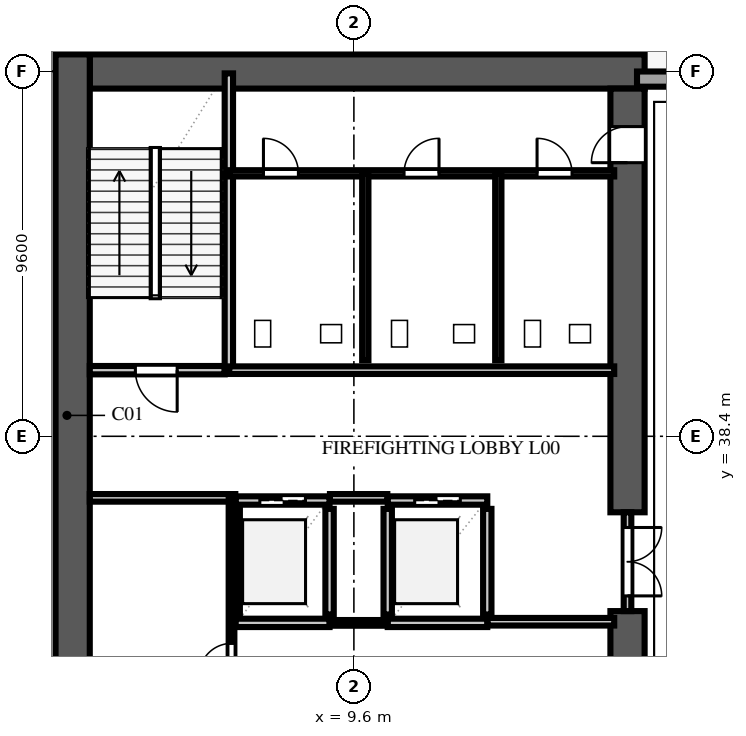
"""IFC4 building model, lengths in metres.
Left out: names, types, materials, properties, quantities, classifications, styles, units other than length and angle.
Written with IfcOpenShell. Run it as: python <this file> out.ifc"""

import sys

from ifc_helpers import new_model, si_unit, direction, frame, frame_2d, origin, place, context, subcontext, project, spatial, rectangle, extrude, element, fill, save


model = new_model("IFC4")
c1 = context("Model", 3, precision=1e-05, world=origin(), true_north=direction((0.0, 1.0)))
c2 = subcontext(c1, "Body", "Model", "MODEL_VIEW")
j1 = project(units=[si_unit("LENGTHUNIT", "METRE"), si_unit("PLANEANGLEUNIT", "RADIAN")], contexts=[c1])
p1 = place(None, origin())
s1 = spatial("IfcSite", under=j1, at=p1, CompositionType="ELEMENT")
p2 = place(p1, origin())
s2 = spatial("IfcBuilding", under=s1, at=p2, CompositionType="ELEMENT")
p3 = place(p2, origin())
s3 = spatial("IfcBuildingStorey", under=s2, at=p3, CompositionType="ELEMENT", Elevation=0.0)
p4 = place(p3, frame((2.65, 48.0, 0.0), z_axis=(0.0, 0.0, 1.0), x_axis=(1.0, 0.0, 0.0)))
e1 = element("IfcWall", 1, at=p4, inside=s3, PredefinedType="SHEAR", context=c2, shape_type="SweptSolid", body=[
    extrude(rectangle(XDim=14.6, YDim=0.9, at=frame_2d((7.3, 0.0))), origin(), (0.0, 0.0, 1.0), 4.86),
])
p5 = place(p3, frame((2.2, 9.15, 0.0), z_axis=(0.0, 0.0, 1.0), x_axis=(0.0, 1.0, 0.0)))
e2 = element("IfcWall", 2, at=p5, inside=s3, PredefinedType="SHEAR", context=c2, shape_type="SweptSolid", body=[
    extrude(rectangle(XDim=39.3, YDim=0.9, at=frame_2d((19.65, 0.0))), origin(), (0.0, 0.0, 1.0), 4.86),
])
p6 = place(p3, frame((16.8, 26.0, 0.0), z_axis=(0.0, 0.0, 1.0), x_axis=(0.0, 1.0, 0.0)))
e3 = element("IfcWall", 3, at=p6, inside=s3, PredefinedType="SHEAR", context=c2, shape_type="SweptSolid", body=[
    extrude(rectangle(XDim=7.8, YDim=0.9, at=frame_2d((3.9, 0.0))), origin(), (0.0, 0.0, 1.0), 4.86),
])
p7 = place(p3, frame((16.8, 36.4, 0.0), z_axis=(0.0, 0.0, 1.0), x_axis=(0.0, 1.0, 0.0)))
e4 = element("IfcWall", 4, at=p7, inside=s3, PredefinedType="SHEAR", context=c2, shape_type="SweptSolid", body=[
    extrude(rectangle(XDim=11.15, YDim=0.9, at=frame_2d((5.575, 0.0))), origin(), (0.0, 0.0, 1.0), 4.86),
])
p8 = place(p7, frame((9.2, 0.0, 0.0)))
e5 = element("IfcOpeningElement", 5, at=p8, cuts=e4, PredefinedType="OPENING", context=c2, shape_type="SweptSolid", body=[
    extrude(rectangle(XDim=0.95, YDim=2.15, at=frame_2d((0.475, 1.075))), frame((0.0, 0.462, 0.0), z_axis=(0.0, -1.0, 0.0), x_axis=(1.0, 0.0, 0.0)), (0.0, 0.0, 1.0), 0.924),
])
p9 = place(p3, frame((17.05, 47.8, 0.0), z_axis=(0.0, 0.0, 1.0), x_axis=(1.0, 0.0, 0.0)))
e6 = element("IfcWall", 6, at=p9, inside=s3, PredefinedType="SOLIDWALL", context=c2, shape_type="SweptSolid", body=[
    extrude(rectangle(XDim=1.35, YDim=0.4, at=frame_2d((0.675, 0.0))), origin(), (0.0, 0.0, 1.0), 4.86),
])
p10 = place(p3, frame((2.65, 40.14, 0.0), z_axis=(0.0, 0.0, 1.0), x_axis=(1.0, 0.0, 0.0)))
e7 = element("IfcWall", 7, at=p10, inside=s3, PredefinedType="SOLIDWALL", context=c2, shape_type="SweptSolid", body=[
    extrude(rectangle(XDim=3.55, YDim=0.22, at=frame_2d((1.775, 0.0))), origin(), (0.0, 0.0, 1.0), 4.86),
])
p11 = place(p10, frame((1.2, 0.0, 0.0)))
e8 = element("IfcOpeningElement", 8, at=p11, cuts=e7, PredefinedType="OPENING", context=c2, shape_type="SweptSolid", body=[
    extrude(rectangle(XDim=1.1, YDim=2.2, at=frame_2d((0.55, 1.1))), frame((0.0, 0.122, 0.0), z_axis=(0.0, -1.0, 0.0), x_axis=(1.0, 0.0, 0.0)), (0.0, 0.0, 1.0), 0.244),
])
p12 = place(p3, frame((6.31, 40.14, 0.0), z_axis=(0.0, 0.0, 1.0), x_axis=(0.0, 1.0, 0.0)))
e9 = element("IfcWall", 9, at=p12, inside=s3, PredefinedType="SOLIDWALL", context=c2, shape_type="SweptSolid", body=[
    extrude(rectangle(XDim=7.81, YDim=0.22, at=frame_2d((3.905, 0.0))), origin(), (0.0, 0.0, 1.0), 4.86),
])
for number, where, z_axis, x_axis in (
    (10, (6.49, 33.71, 0.0), (0.0, 0.0, 1.0), (0.0, 1.0, 0.0)),
    (11, (8.96, 33.71, 0.0), (0.0, 0.0, 1.0), (0.0, 1.0, 0.0)),
):
    element("IfcWall", number, at=place(p3, frame(where, z_axis=z_axis, x_axis=x_axis)), inside=s3, PredefinedType="SOLIDWALL", context=c2, shape_type="SweptSolid", body=[
        extrude(rectangle(XDim=2.78, YDim=0.22, at=frame_2d((1.39, 0.0))), origin(), (0.0, 0.0, 1.0), 4.86),
    ])
p13 = place(p3, frame((6.49, 33.49, 0.0), z_axis=(0.0, 0.0, 1.0), x_axis=(1.0, 0.0, 0.0)))
e12 = element("IfcWall", 12, at=p13, inside=s3, PredefinedType="SOLIDWALL", context=c2, shape_type="SweptSolid", body=[
    extrude(rectangle(XDim=2.47, YDim=0.22, at=frame_2d((1.235, 0.0))), origin(), (0.0, 0.0, 1.0), 4.86),
])
p14 = place(p3, frame((6.49, 36.71, 0.0), z_axis=(0.0, 0.0, 1.0), x_axis=(1.0, 0.0, 0.0)))
e13 = element("IfcWall", 13, at=p14, inside=s3, PredefinedType="SOLIDWALL", context=c2, shape_type="SweptSolid", body=[
    extrude(rectangle(XDim=2.47, YDim=0.22, at=frame_2d((1.235, 0.0))), origin(), (0.0, 0.0, 1.0), 4.86),
])
p15 = place(p14, frame((0.635, 0.0, 0.0)))
e14 = element("IfcOpeningElement", 14, at=p15, cuts=e13, PredefinedType="OPENING", context=c2, shape_type="SweptSolid", body=[
    extrude(rectangle(XDim=1.2, YDim=2.2, at=frame_2d((0.6, 1.1))), frame((0.0, 0.122, 0.0), z_axis=(0.0, -1.0, 0.0), x_axis=(1.0, 0.0, 0.0)), (0.0, 0.0, 1.0), 0.244),
])
for number, where, z_axis, x_axis in (
    (15, (10.49, 33.71, 0.0), (0.0, 0.0, 1.0), (0.0, 1.0, 0.0)),
    (16, (13.11, 33.71, 0.0), (0.0, 0.0, 1.0), (0.0, 1.0, 0.0)),
):
    element("IfcWall", number, at=place(p3, frame(where, z_axis=z_axis, x_axis=x_axis)), inside=s3, PredefinedType="SOLIDWALL", context=c2, shape_type="SweptSolid", body=[
        extrude(rectangle(XDim=2.78, YDim=0.22, at=frame_2d((1.39, 0.0))), origin(), (0.0, 0.0, 1.0), 4.86),
    ])
p16 = place(p3, frame((10.49, 33.49, 0.0), z_axis=(0.0, 0.0, 1.0), x_axis=(1.0, 0.0, 0.0)))
e17 = element("IfcWall", 17, at=p16, inside=s3, PredefinedType="SOLIDWALL", context=c2, shape_type="SweptSolid", body=[
    extrude(rectangle(XDim=2.62, YDim=0.22, at=frame_2d((1.31, 0.0))), origin(), (0.0, 0.0, 1.0), 4.86),
])
p17 = place(p3, frame((10.49, 36.71, 0.0), z_axis=(0.0, 0.0, 1.0), x_axis=(1.0, 0.0, 0.0)))
e18 = element("IfcWall", 18, at=p17, inside=s3, PredefinedType="SOLIDWALL", context=c2, shape_type="SweptSolid", body=[
    extrude(rectangle(XDim=2.62, YDim=0.22, at=frame_2d((1.31, 0.0))), origin(), (0.0, 0.0, 1.0), 4.86),
])
p18 = place(p17, frame((0.71, 0.0, 0.0)))
e19 = element("IfcOpeningElement", 19, at=p18, cuts=e18, PredefinedType="OPENING", context=c2, shape_type="SweptSolid", body=[
    extrude(rectangle(XDim=1.2, YDim=2.2, at=frame_2d((0.6, 1.1))), frame((0.0, 0.122, 0.0), z_axis=(0.0, -1.0, 0.0), x_axis=(1.0, 0.0, 0.0)), (0.0, 0.0, 1.0), 0.244),
])
p19 = place(p3, frame((2.65, 36.78, 0.0), z_axis=(0.0, 0.0, 1.0), x_axis=(1.0, 0.0, 0.0)))
e20 = element("IfcWall", 20, at=p19, inside=s3, PredefinedType="SOLIDWALL", context=c2, shape_type="SweptSolid", body=[
    extrude(rectangle(XDim=3.83, YDim=0.2, at=frame_2d((1.915, 0.0))), origin(), (0.0, 0.0, 1.0), 4.86),
])
p20 = place(p3, frame((8.97, 36.78, 0.0), z_axis=(0.0, 0.0, 1.0), x_axis=(1.0, 0.0, 0.0)))
e21 = element("IfcWall", 21, at=p20, inside=s3, PredefinedType="SOLIDWALL", context=c2, shape_type="SweptSolid", body=[
    extrude(rectangle(XDim=1.51, YDim=0.2, at=frame_2d((0.755, 0.0))), origin(), (0.0, 0.0, 1.0), 4.86),
])
p21 = place(p3, frame((13.12, 33.52, 0.0), z_axis=(0.0, 0.0, 1.0), x_axis=(1.0, 0.0, 0.0)))
e22 = element("IfcWall", 22, at=p21, inside=s3, PredefinedType="SOLIDWALL", context=c2, shape_type="SweptSolid", body=[
    extrude(rectangle(XDim=3.33, YDim=0.2, at=frame_2d((1.665, 0.0))), origin(), (0.0, 0.0, 1.0), 4.86),
])
p22 = place(p3, frame((6.32, 40.14, 0.0), z_axis=(0.0, 0.0, 1.0), x_axis=(1.0, 0.0, 0.0)))
e23 = element("IfcWall", 23, at=p22, inside=s3, PredefinedType="SOLIDWALL", context=c2, shape_type="SweptSolid", body=[
    extrude(rectangle(XDim=10.13, YDim=0.2, at=frame_2d((5.065, 0.0))), origin(), (0.0, 0.0, 1.0), 4.86),
])
p23 = place(p3, frame((16.8, 33.8, 0.0), z_axis=(0.0, 0.0, 1.0), x_axis=(0.0, 1.0, 0.0)))
e24 = element("IfcWall", 24, at=p23, inside=s3, PredefinedType="SOLIDWALL", context=c2, shape_type="SweptSolid", body=[
    extrude(rectangle(XDim=2.6, YDim=0.2, at=frame_2d((1.3, 0.0))), origin(), (0.0, 0.0, 1.0), 4.86),
])
p24 = place(p23, frame((0.4, 0.0, 0.0)))
e25 = element("IfcOpeningElement", 25, at=p24, cuts=e24, PredefinedType="OPENING", context=c2, shape_type="SweptSolid", body=[
    extrude(rectangle(XDim=1.8, YDim=2.2, at=frame_2d((0.9, 1.1))), frame((0.0, 0.112, 0.0), z_axis=(0.0, -1.0, 0.0), x_axis=(1.0, 0.0, 0.0)), (0.0, 0.0, 1.0), 0.224),
])
p25 = place(p3, frame((8.965, 33.49, 0.0), z_axis=(0.0, 0.0, 1.0), x_axis=(1.0, 0.0, 0.0)))
e26 = element("IfcWall", 26, at=p25, inside=s3, PredefinedType="PARTITIONING", context=c2, shape_type="SweptSolid", body=[
    extrude(rectangle(XDim=1.52, YDim=0.15, at=frame_2d((0.76, 0.0))), origin(), (0.0, 0.0, 1.0), 4.86),
])
p26 = place(p3, frame((6.38, 17.8, 0.0), z_axis=(0.0, 0.0, 1.0), x_axis=(0.0, 1.0, 0.0)))
e27 = element("IfcWall", 27, at=p26, inside=s3, PredefinedType="PARTITIONING", context=c2, shape_type="SweptSolid", body=[
    extrude(rectangle(XDim=18.98, YDim=0.15, at=frame_2d((9.49, 0.0))), origin(), (0.0, 0.0, 1.0), 4.86),
])
p27 = place(p26, frame((14.3, 0.0, 0.0)))
e28 = element("IfcOpeningElement", 28, at=p27, cuts=e27, PredefinedType="OPENING", context=c2, shape_type="SweptSolid", body=[
    extrude(rectangle(XDim=0.85, YDim=2.1, at=frame_2d((0.425, 1.05))), frame((0.0, 0.087, 0.0), z_axis=(0.0, -1.0, 0.0), x_axis=(1.0, 0.0, 0.0)), (0.0, 0.0, 1.0), 0.174),
])
p28 = place(p3, frame((6.32, 45.32, 0.0), z_axis=(0.0, 0.0, 1.0), x_axis=(1.0, 0.0, 0.0)))
e29 = element("IfcWall", 29, at=p28, inside=s3, PredefinedType="PLUMBINGWALL", context=c2, shape_type="SweptSolid", body=[
    extrude(rectangle(XDim=10.13, YDim=0.165, at=frame_2d((5.065, 0.0))), origin(), (0.0, 0.0, 1.0), 4.86),
])
p29 = place(p28, frame((0.9, 0.0, 0.0)))
e30 = element("IfcOpeningElement", 30, at=p29, cuts=e29, PredefinedType="OPENING", context=c2, shape_type="SweptSolid", body=[
    extrude(rectangle(XDim=0.92, YDim=2.15, at=frame_2d((0.46, 1.075))), frame((0.0, 0.094, 0.0), z_axis=(0.0, -1.0, 0.0), x_axis=(1.0, 0.0, 0.0)), (0.0, 0.0, 1.0), 0.189),
])
p30 = place(p28, frame((4.6, 0.0, 0.0)))
e31 = element("IfcOpeningElement", 31, at=p30, cuts=e29, PredefinedType="OPENING", context=c2, shape_type="SweptSolid", body=[
    extrude(rectangle(XDim=0.92, YDim=2.15, at=frame_2d((0.46, 1.075))), frame((0.0, 0.094, 0.0), z_axis=(0.0, -1.0, 0.0), x_axis=(1.0, 0.0, 0.0)), (0.0, 0.0, 1.0), 0.189),
])
p31 = place(p28, frame((8.1, 0.0, 0.0)))
e32 = element("IfcOpeningElement", 32, at=p31, cuts=e29, PredefinedType="OPENING", context=c2, shape_type="SweptSolid", body=[
    extrude(rectangle(XDim=0.92, YDim=2.15, at=frame_2d((0.46, 1.075))), frame((0.0, 0.094, 0.0), z_axis=(0.0, -1.0, 0.0), x_axis=(1.0, 0.0, 0.0)), (0.0, 0.0, 1.0), 0.189),
])
for number, where, z_axis, x_axis in (
    (33, (9.9, 40.4, 0.0), (0.0, 0.0, 1.0), (0.0, 1.0, 0.0)),
    (34, (13.4, 40.4, 0.0), (0.0, 0.0, 1.0), (0.0, 1.0, 0.0)),
):
    element("IfcWall", number, at=place(p3, frame(where, z_axis=z_axis, x_axis=x_axis)), inside=s3, PredefinedType="PLUMBINGWALL", context=c2, shape_type="SweptSolid", body=[
        extrude(rectangle(XDim=4.92, YDim=0.165, at=frame_2d((2.46, 0.0))), origin(), (0.0, 0.0, 1.0), 4.86),
    ])
p32 = place(p11, frame((1.1, 0.0, 0.0), z_axis=(0.0, 0.0, 1.0), x_axis=(-1.0, 0.0, 0.0)))
e35 = element("IfcDoor", 35, at=p32, inside=s3, OperationType="SINGLE_SWING_LEFT", PredefinedType="DOOR", context=c2, shape_type="SweptSolid", body=[
    extrude(rectangle(XDim=1.1, YDim=2.2, at=frame_2d((0.55, 1.1))), frame((0.0, 0.025, 0.0), z_axis=(0.0, -1.0, 0.0), x_axis=(1.0, 0.0, 0.0)), (0.0, 0.0, 1.0), 0.05),
])
fill(e8, e35)
p33 = place(p15, origin())
e36 = element("IfcDoor", 36, at=p33, inside=s3, OperationType="DOUBLE_DOOR_SLIDING", PredefinedType="DOOR", context=c2, shape_type="SweptSolid", body=[
    extrude(rectangle(XDim=1.2, YDim=2.2, at=frame_2d((0.6, 1.1))), frame((0.0, 0.025, 0.0), z_axis=(0.0, -1.0, 0.0), x_axis=(1.0, 0.0, 0.0)), (0.0, 0.0, 1.0), 0.05),
])
fill(e14, e36)
p34 = place(p18, origin())
e37 = element("IfcDoor", 37, at=p34, inside=s3, OperationType="DOUBLE_DOOR_SLIDING", PredefinedType="DOOR", context=c2, shape_type="SweptSolid", body=[
    extrude(rectangle(XDim=1.2, YDim=2.2, at=frame_2d((0.6, 1.1))), frame((0.0, 0.025, 0.0), z_axis=(0.0, -1.0, 0.0), x_axis=(1.0, 0.0, 0.0)), (0.0, 0.0, 1.0), 0.05),
])
fill(e19, e37)
p35 = place(p8, origin())
e38 = element("IfcDoor", 38, at=p35, inside=s3, OperationType="SINGLE_SWING_LEFT", PredefinedType="DOOR", context=c2, shape_type="SweptSolid", body=[
    extrude(rectangle(XDim=0.95, YDim=2.15, at=frame_2d((0.475, 1.075))), frame((0.0, 0.025, 0.0), z_axis=(0.0, -1.0, 0.0), x_axis=(1.0, 0.0, 0.0)), (0.0, 0.0, 1.0), 0.05),
])
fill(e5, e38)
p36 = place(p24, frame((1.8, 0.0, 0.0), z_axis=(0.0, 0.0, 1.0), x_axis=(-1.0, 0.0, 0.0)))
e39 = element("IfcDoor", 39, at=p36, inside=s3, OperationType="DOUBLE_DOOR_SINGLE_SWING", PredefinedType="DOOR", context=c2, shape_type="SweptSolid", body=[
    extrude(rectangle(XDim=1.8, YDim=2.2, at=frame_2d((0.9, 1.1))), frame((0.0, 0.025, 0.0), z_axis=(0.0, -1.0, 0.0), x_axis=(1.0, 0.0, 0.0)), (0.0, 0.0, 1.0), 0.05),
])
fill(e25, e39)
p37 = place(p27, origin())
e40 = element("IfcDoor", 40, at=p37, inside=s3, OperationType="SINGLE_SWING_LEFT", PredefinedType="DOOR", context=c2, shape_type="SweptSolid", body=[
    extrude(rectangle(XDim=0.85, YDim=2.1, at=frame_2d((0.425, 1.05))), frame((0.0, 0.025, 0.0), z_axis=(0.0, -1.0, 0.0), x_axis=(1.0, 0.0, 0.0)), (0.0, 0.0, 1.0), 0.05),
])
fill(e28, e40)
p38 = place(p29, origin())
e41 = element("IfcDoor", 41, at=p38, inside=s3, OperationType="SINGLE_SWING_LEFT", PredefinedType="DOOR", context=c2, shape_type="SweptSolid", body=[
    extrude(rectangle(XDim=0.92, YDim=2.15, at=frame_2d((0.46, 1.075))), frame((0.0, 0.025, 0.0), z_axis=(0.0, -1.0, 0.0), x_axis=(1.0, 0.0, 0.0)), (0.0, 0.0, 1.0), 0.05),
])
fill(e30, e41)
p39 = place(p30, origin())
e42 = element("IfcDoor", 42, at=p39, inside=s3, OperationType="SINGLE_SWING_RIGHT", PredefinedType="DOOR", context=c2, shape_type="SweptSolid", body=[
    extrude(rectangle(XDim=0.92, YDim=2.15, at=frame_2d((0.46, 1.075))), frame((0.0, 0.025, 0.0), z_axis=(0.0, -1.0, 0.0), x_axis=(1.0, 0.0, 0.0)), (0.0, 0.0, 1.0), 0.05),
])
fill(e31, e42)
p40 = place(p31, origin())
e43 = element("IfcDoor", 43, at=p40, inside=s3, OperationType="SINGLE_SWING_LEFT", PredefinedType="DOOR", context=c2, shape_type="SweptSolid", body=[
    extrude(rectangle(XDim=0.92, YDim=2.15, at=frame_2d((0.46, 1.075))), frame((0.0, 0.025, 0.0), z_axis=(0.0, -1.0, 0.0), x_axis=(1.0, 0.0, 0.0)), (0.0, 0.0, 1.0), 0.05),
])
fill(e32, e43)
save(model, sys.argv[1])
